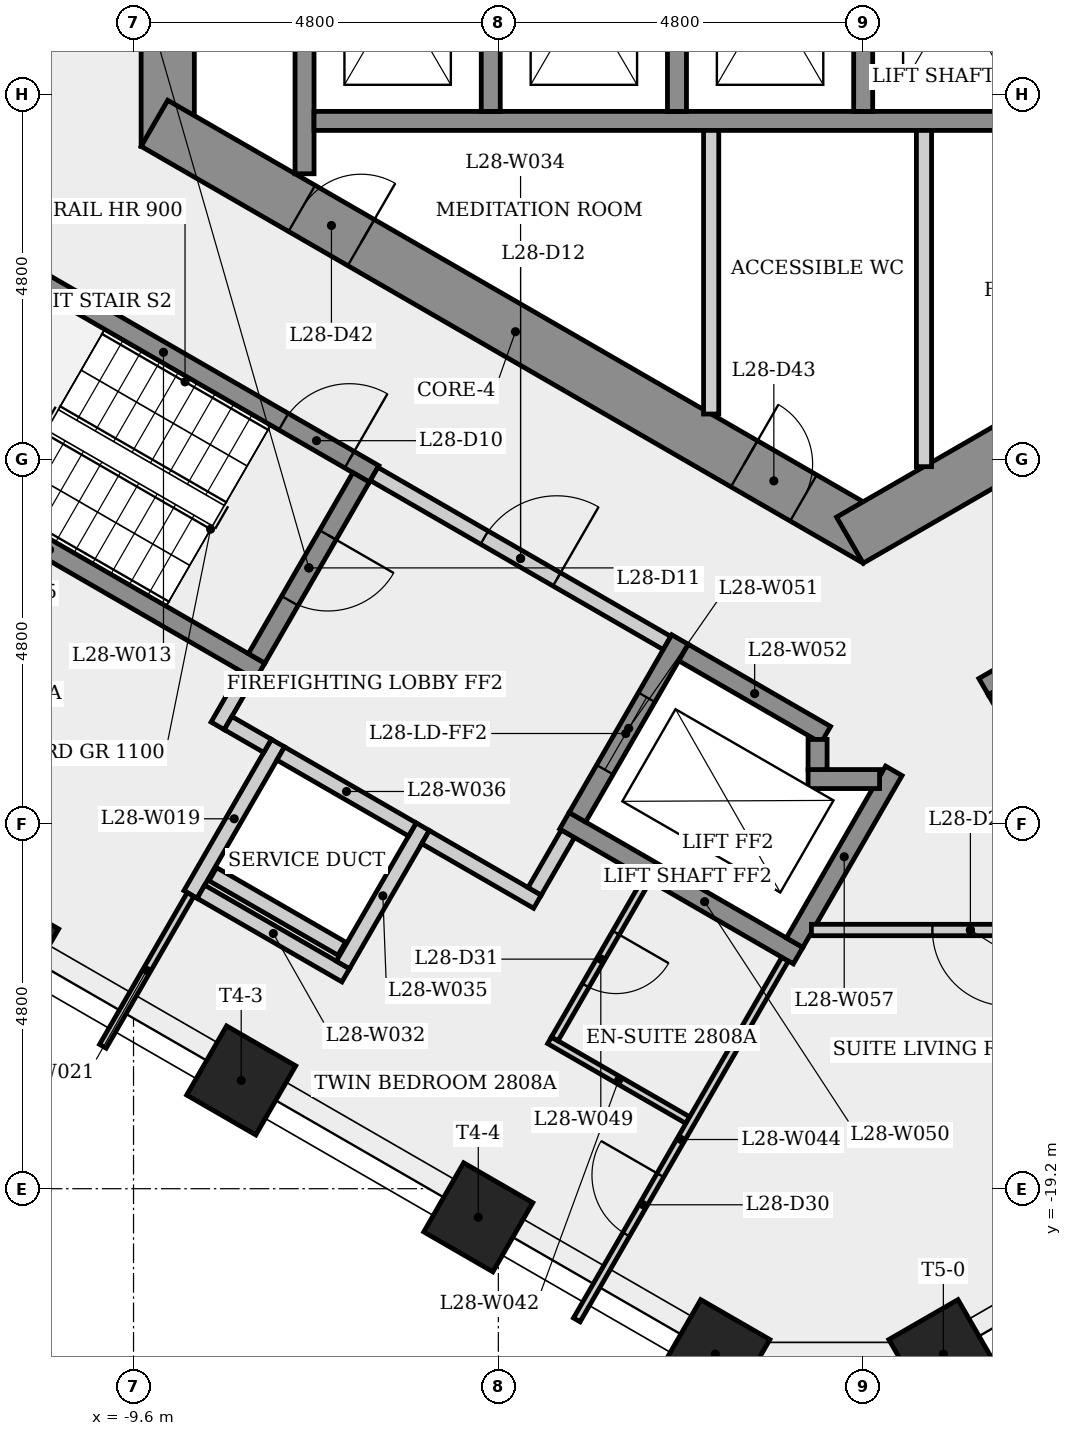
"""IFC4 building model, lengths in metres.
Left out: names, types, materials, properties, quantities, classifications, styles, units other than length and angle.
Written with IfcOpenShell. Run it as: python <this file> out.ifc"""

import sys

from ifc_helpers import new_model, si_unit, direction, frame, frame_2d, origin, origin_2d, place, context, subcontext, project, spatial, rectangle, extrude, element, fill, save


model = new_model("IFC4")
c1 = context("Model", 3, precision=1e-05, world=origin(), true_north=direction((0.0, 1.0)))
c2 = subcontext(c1, "Body", "Model", "MODEL_VIEW")
j1 = project(units=[si_unit("LENGTHUNIT", "METRE"), si_unit("PLANEANGLEUNIT", "RADIAN")], contexts=[c1])
p1 = place(None, origin())
s1 = spatial("IfcSite", under=j1, at=p1, CompositionType="ELEMENT")
p2 = place(p1, origin())
s2 = spatial("IfcBuilding", under=s1, at=p2, CompositionType="ELEMENT")
p3 = place(p2, frame((0.0, 0.0, 106.9)))
s3 = spatial("IfcBuildingStorey", under=s2, at=p3, CompositionType="ELEMENT", Elevation=106.9)
p4 = place(p3, frame((-9.15, 5.485, 0.0), z_axis=(0.0, 0.0, 1.0), x_axis=(0.0, -1.0, 0.0)))
e1 = element("IfcWall", 1, at=p4, inside=s3, PredefinedType="SHEAR", context=c2, shape_type="SweptSolid", body=[
    extrude(rectangle(XDim=10.97, YDim=0.7, at=frame_2d((5.485, 0.0))), origin(), (0.0, 0.0, 1.0), 3.4),
])
p5 = place(p4, frame((4.685, 0.0, 0.0)))
e2 = element("IfcOpeningElement", 2, at=p5, cuts=e1, PredefinedType="OPENING", context=c2, shape_type="SweptSolid", body=[
    extrude(rectangle(XDim=1.6, YDim=2.1, at=frame_2d((0.8, 1.05))), frame((0.0, 0.36, 0.0), z_axis=(0.0, -1.0, 0.0), x_axis=(1.0, 0.0, 0.0)), (0.0, 0.0, 1.0), 0.72),
])
p6 = place(p3, frame((-9.325, -5.182, 0.0), z_axis=(0.0, 0.0, 1.0), x_axis=(0.866023993627, -0.500002442456, 0.0)))
e3 = element("IfcWall", 3, at=p6, inside=s3, PredefinedType="SHEAR", context=c2, shape_type="SweptSolid", body=[
    extrude(rectangle(XDim=10.97, YDim=0.7, at=frame_2d((5.485, 0.0))), origin(), (0.0, 0.0, 1.0), 3.4),
])
p7 = place(p6, frame((2.239, 0.0, 0.0)))
e4 = element("IfcOpeningElement", 4, at=p7, cuts=e3, PredefinedType="OPENING", context=c2, shape_type="SweptSolid", body=[
    extrude(rectangle(XDim=0.9, YDim=2.1, at=frame_2d((0.45, 1.05))), frame((0.0, 0.36, 0.0), z_axis=(0.0, -1.0, 0.0), x_axis=(1.0, 0.0, 0.0)), (0.0, 0.0, 1.0), 0.72),
])
p8 = place(p6, frame((8.96, 0.0, 0.0)))
e5 = element("IfcOpeningElement", 5, at=p8, cuts=e3, PredefinedType="OPENING", context=c2, shape_type="SweptSolid", body=[
    extrude(rectangle(XDim=0.9, YDim=2.1, at=frame_2d((0.45, 1.05))), frame((0.0, 0.36, 0.0), z_axis=(0.0, -1.0, 0.0), x_axis=(1.0, 0.0, 0.0)), (0.0, 0.0, 1.0), 0.72),
])
p9 = place(p3, frame((-0.175, -10.667, 0.0), z_axis=(0.0, 0.0, 1.0), x_axis=(0.866023993627, 0.500002442456, 0.0)))
e6 = element("IfcWall", 6, at=p9, inside=s3, PredefinedType="SHEAR", context=c2, shape_type="SweptSolid", body=[
    extrude(rectangle(XDim=10.97, YDim=0.7, at=frame_2d((5.485, 0.0))), origin(), (0.0, 0.0, 1.0), 3.4),
])
p10 = place(p9, frame((7.137, 0.0, 0.0)))
e7 = element("IfcOpeningElement", 7, at=p10, cuts=e6, PredefinedType="OPENING", context=c2, shape_type="SweptSolid", body=[
    extrude(rectangle(XDim=0.9, YDim=2.1, at=frame_2d((0.45, 1.05))), frame((0.0, 0.36, 0.0), z_axis=(0.0, -1.0, 0.0), x_axis=(1.0, 0.0, 0.0)), (0.0, 0.0, 1.0), 0.72),
])
for number, where, z_axis, x_axis in (
    (8, (-11.302, -15.975, 0.0), (0.0, 0.0, 1.0), (-0.5, -0.866, 0.0)),
    (9, (-8.183, -17.775, 0.0), (0.0, 0.0, 1.0), (-0.5, -0.866, 0.0)),
    (10, (-5.064, -19.576, 0.0), (0.0, 0.0, 1.0), (-0.5, -0.866, 0.0)),
    (11, (-1.945, -21.377, 0.0), (0.0, 0.0, 1.0), (-0.5, -0.866, 0.0)),
    (12, (1.055, -21.377, 0.0), (0.0, 0.0, 1.0), (0.5, -0.866, 0.0)),
):
    element("IfcColumn", number, at=place(p3, frame(where, z_axis=z_axis, x_axis=x_axis)), inside=s3, PredefinedType="COLUMN", context=c2, shape_type="SweptSolid", body=[
        extrude(rectangle(XDim=1.05, YDim=1.05, at=origin_2d()), origin(), (0.0, 0.0, 1.0), 3.4),
    ])
p11 = place(p3, frame((-11.977, -6.595, 0.0), z_axis=(0.0, 0.0, 1.0), x_axis=(0.866025499775, -0.499999833739, 0.0)))
e13 = element("IfcWall", 13, at=p11, inside=s3, PredefinedType="SHEAR", context=c2, shape_type="SweptSolid", body=[
    extrude(rectangle(XDim=6.4, YDim=0.25, at=frame_2d((3.2, 0.0))), origin(), (0.0, 0.0, 1.0), 3.05),
])
p12 = place(p11, frame((5.025, 0.0, 0.0)))
e14 = element("IfcOpeningElement", 14, at=p12, cuts=e13, PredefinedType="OPENING", context=c2, shape_type="SweptSolid", body=[
    extrude(rectangle(XDim=1.0, YDim=2.1, at=frame_2d((0.5, 1.05))), frame((0.0, 0.135, 0.0), z_axis=(0.0, -1.0, 0.0), x_axis=(1.0, 0.0, 0.0)), (0.0, 0.0, 1.0), 0.27),
])
p13 = place(p3, frame((-8.85, -15.329, 0.0), z_axis=(0.0, 0.0, 1.0), x_axis=(0.500077740698, 0.865980515519, 0.0)))
e15 = element("IfcWall", 15, at=p13, inside=s3, PredefinedType="PLUMBINGWALL", context=c2, shape_type="SweptSolid", body=[
    extrude(rectangle(XDim=2.3, YDim=0.2, at=frame_2d((1.15, 0.0))), origin(), (0.0, 0.0, 1.0), 3.05),
])
p14 = place(p3, frame((-8.85, -15.329, 0.0), z_axis=(0.0, 0.0, 1.0), x_axis=(-0.500009533716, -0.866019899421, 0.0)))
e16 = element("IfcWall", 16, at=p14, inside=s3, PredefinedType="PARTITIONING", context=c2, shape_type="SweptSolid", body=[
    extrude(rectangle(XDim=2.307, YDim=0.1, at=frame_2d((1.153, 0.0))), origin(), (0.0, 0.0, 1.0), 3.05),
])
p15 = place(p3, frame((-8.493, -13.11, 0.0), z_axis=(0.0, 0.0, 1.0), x_axis=(0.500067724834, 0.865986299303, 0.0)))
e17 = element("IfcWall", 17, at=p15, inside=s3, PredefinedType="PARTITIONING", context=c2, shape_type="SweptSolid", body=[
    extrude(rectangle(XDim=0.775, YDim=0.2, at=frame_2d((0.388, 0.0))), origin(), (0.0, 0.0, 1.0), 3.05),
])
p16 = place(p3, frame((-7.935, -12.393, 0.0), z_axis=(0.0, 0.0, 1.0), x_axis=(-0.866025499775, 0.499999833739, 0.0)))
e18 = element("IfcWall", 18, at=p16, inside=s3, PredefinedType="SHEAR", context=c2, shape_type="SweptSolid", body=[
    extrude(rectangle(XDim=6.4, YDim=0.25, at=frame_2d((3.2, 0.0))), origin(), (0.0, 0.0, 1.0), 3.05),
])
p17 = place(p3, frame((-7.836, -13.373, 0.0), z_axis=(0.0, 0.0, 1.0), x_axis=(-0.866232998003, 0.499640263761, 0.0)))
e19 = element("IfcWall", 19, at=p17, inside=s3, PredefinedType="PARTITIONING", context=c2, shape_type="SweptSolid", body=[
    extrude(rectangle(XDim=0.6, YDim=0.2, at=frame_2d((0.3, 0.0))), origin(), (0.0, 0.0, 1.0), 3.05),
])
p18 = place(p3, frame((-7.35, -5.846, 0.0), z_axis=(0.0, 0.0, 1.0), x_axis=(0.0, 1.0, 0.0)))
e20 = element("IfcWall", 20, at=p18, inside=s3, PredefinedType="SHEAR", context=c2, shape_type="SweptSolid", body=[
    extrude(rectangle(XDim=4.171, YDim=0.25, at=frame_2d((2.085, 0.0))), origin(), (0.0, 0.0, 1.0), 3.05),
])
p19 = place(p3, frame((-6.808, -16.392, 0.0), z_axis=(0.0, 0.0, 1.0), x_axis=(-0.866008176907, 0.50002983664, 0.0)))
e21 = element("IfcWall", 21, at=p19, inside=s3, PredefinedType="PLUMBINGWALL", context=c2, shape_type="SweptSolid", body=[
    extrude(rectangle(XDim=2.2, YDim=0.2, at=frame_2d((1.1, 0.0))), origin(), (0.0, 0.0, 1.0), 3.05),
])
p20 = place(p3, frame((-6.605, -9.841, 0.0), z_axis=(0.0, 0.0, 1.0), x_axis=(-0.499996545922, -0.866027397988, 0.0)))
e22 = element("IfcWall", 22, at=p20, inside=s3, PredefinedType="SHEAR", context=c2, shape_type="SweptSolid", body=[
    extrude(rectangle(XDim=2.75, YDim=0.25, at=frame_2d((1.375, 0.0))), origin(), (0.0, 0.0, 1.0), 3.05),
])
p21 = place(p20, frame((0.875, 0.0, 0.0)))
e23 = element("IfcOpeningElement", 23, at=p21, cuts=e22, PredefinedType="OPENING", context=c2, shape_type="SweptSolid", body=[
    extrude(rectangle(XDim=1.0, YDim=2.1, at=frame_2d((0.5, 1.05))), frame((0.0, 0.135, 0.0), z_axis=(0.0, -1.0, 0.0), x_axis=(1.0, 0.0, 0.0)), (0.0, 0.0, 1.0), 0.27),
])
p22 = place(p3, frame((-6.435, -9.795, 0.0), z_axis=(0.0, 0.0, 1.0), x_axis=(0.866012907634, -0.500021643343, 0.0)))
e24 = element("IfcWall", 24, at=p22, inside=s3, PredefinedType="PARTITIONING", context=c2, shape_type="SweptSolid", body=[
    extrude(rectangle(XDim=4.45, YDim=0.2, at=frame_2d((2.225, 0.0))), origin(), (0.0, 0.0, 1.0), 3.05),
])
p23 = place(p22, frame((1.675, 0.0, 0.0)))
e25 = element("IfcOpeningElement", 25, at=p23, cuts=e24, PredefinedType="OPENING", context=c2, shape_type="SweptSolid", body=[
    extrude(rectangle(XDim=1.1, YDim=2.1, at=frame_2d((0.55, 1.05))), frame((0.0, 0.11, 0.0), z_axis=(0.0, -1.0, 0.0), x_axis=(1.0, 0.0, 0.0)), (0.0, 0.0, 1.0), 0.22),
])
p24 = place(p3, frame((-5.795, -14.437, 0.0), z_axis=(0.0, 0.0, 1.0), x_axis=(-0.500027713859, -0.866009402589, 0.0)))
e26 = element("IfcWall", 26, at=p24, inside=s3, PredefinedType="PLUMBINGWALL", context=c2, shape_type="SweptSolid", body=[
    extrude(rectangle(XDim=2.1, YDim=0.2, at=frame_2d((1.05, 0.0))), origin(), (0.0, 0.0, 1.0), 3.05),
])
p25 = place(p3, frame((-5.931, -14.473, 0.0), z_axis=(0.0, 0.0, 1.0), x_axis=(-0.866041268327, 0.499972520799, 0.0)))
e27 = element("IfcWall", 27, at=p25, inside=s3, PredefinedType="PLUMBINGWALL", context=c2, shape_type="SweptSolid", body=[
    extrude(rectangle(XDim=2.0, YDim=0.2, at=frame_2d((1.0, 0.0))), origin(), (0.0, 0.0, 1.0), 3.05),
])
p26 = place(p3, frame((-7.225, -5.15, 0.0), z_axis=(0.0, 0.0, 1.0), x_axis=(1.0, 0.0, 0.0)))
e28 = element("IfcWall", 28, at=p26, inside=s3, PredefinedType="SHEAR", context=c2, shape_type="SweptSolid", body=[
    extrude(rectangle(XDim=14.7, YDim=0.25, at=frame_2d((7.35, 0.0))), origin(), (0.0, 0.0, 1.0), 3.05),
])
p27 = place(p3, frame((-4.9, -1.925, 0.0), z_axis=(0.0, 0.0, 1.0), x_axis=(0.0, -1.0, 0.0)))
e29 = element("IfcWall", 29, at=p27, inside=s3, PredefinedType="SHEAR", context=c2, shape_type="SweptSolid", body=[
    extrude(rectangle(XDim=3.1, YDim=0.25, at=frame_2d((1.55, 0.0))), origin(), (0.0, 0.0, 1.0), 3.4),
])
p28 = place(p3, frame((-4.286, -15.423, 0.0), z_axis=(0.0, 0.0, 1.0), x_axis=(-0.866025371046, 0.500000056704, 0.0)))
e30 = element("IfcWall", 30, at=p28, inside=s3, PredefinedType="PARTITIONING", context=c2, shape_type="SweptSolid", body=[
    extrude(rectangle(XDim=1.7, YDim=0.2, at=frame_2d((0.85, 0.0))), origin(), (0.0, 0.0, 1.0), 3.05),
])
p29 = place(p3, frame((-4.127, -17.247, 0.0), z_axis=(0.0, 0.0, 1.0), x_axis=(0.866038466041, -0.499977374825, 0.0)))
e31 = element("IfcWall", 31, at=p29, inside=s3, PredefinedType="PARTITIONING", context=c2, shape_type="SweptSolid", body=[
    extrude(rectangle(XDim=2.1, YDim=0.1, at=frame_2d((1.05, 0.0))), origin(), (0.0, 0.0, 1.0), 3.05),
])
p30 = place(p3, frame((-3.885, -14.529, 0.0), z_axis=(0.0, 0.0, 1.0), x_axis=(-0.499859285417, -0.866106630146, 0.0)))
e32 = element("IfcWall", 32, at=p30, inside=s3, PredefinedType="PARTITIONING", context=c2, shape_type="SweptSolid", body=[
    extrude(rectangle(XDim=0.875, YDim=0.2, at=frame_2d((0.438, 0.0))), origin(), (0.0, 0.0, 1.0), 3.05),
])
p31 = place(p3, frame((-3.768, -20.926, 0.0), z_axis=(0.0, 0.0, 1.0), x_axis=(0.499980760091, 0.866036511666, 0.0)))
e33 = element("IfcWall", 33, at=p31, inside=s3, PredefinedType="PARTITIONING", context=c2, shape_type="SweptSolid", body=[
    extrude(rectangle(XDim=5.482, YDim=0.1, at=frame_2d((2.741, 0.0))), origin(), (0.0, 0.0, 1.0), 3.05),
])
p32 = place(p31, frame((1.299, 0.0, 0.0)))
e34 = element("IfcOpeningElement", 34, at=p32, cuts=e33, PredefinedType="OPENING", context=c2, shape_type="SweptSolid", body=[
    extrude(rectangle(XDim=0.9, YDim=2.1, at=frame_2d((0.45, 1.05))), frame((0.0, 0.06, 0.0), z_axis=(0.0, -1.0, 0.0), x_axis=(1.0, 0.0, 0.0)), (0.0, 0.0, 1.0), 0.12),
])
p33 = place(p3, frame((-2.846, -15.129, 0.0), z_axis=(0.0, 0.0, 1.0), x_axis=(-0.500047793048, -0.865997808697, 0.0)))
e35 = element("IfcWall", 35, at=p33, inside=s3, PredefinedType="PARTITIONING", context=c2, shape_type="SweptSolid", body=[
    extrude(rectangle(XDim=2.425, YDim=0.1, at=frame_2d((1.212, 0.0))), origin(), (0.0, 0.0, 1.0), 3.05),
])
p34 = place(p33, frame((0.812, 0.0, 0.0)))
e36 = element("IfcOpeningElement", 36, at=p34, cuts=e35, PredefinedType="OPENING", context=c2, shape_type="SweptSolid", body=[
    extrude(rectangle(XDim=0.8, YDim=2.1, at=frame_2d((0.4, 1.05))), frame((0.0, 0.06, 0.0), z_axis=(0.0, -1.0, 0.0), x_axis=(1.0, 0.0, 0.0)), (0.0, 0.0, 1.0), 0.12),
])
p35 = place(p3, frame((-3.931, -14.358, 0.0), z_axis=(0.0, 0.0, 1.0), x_axis=(0.8660424351, -0.499970499736, 0.0)))
e37 = element("IfcWall", 37, at=p35, inside=s3, PredefinedType="SHEAR", context=c2, shape_type="SweptSolid", body=[
    extrude(rectangle(XDim=3.55, YDim=0.25, at=frame_2d((1.775, 0.0))), origin(), (0.0, 0.0, 1.0), 3.05),
])
p36 = place(p3, frame((-2.41, -11.974, 0.0), z_axis=(0.0, 0.0, 1.0), x_axis=(-0.50000943426, -0.866019956843, 0.0)))
e38 = element("IfcWall", 38, at=p36, inside=s3, PredefinedType="SHEAR", context=c2, shape_type="SweptSolid", body=[
    extrude(rectangle(XDim=2.7, YDim=0.25, at=frame_2d((1.35, 0.0))), origin(), (0.0, 0.0, 1.0), 3.05),
])
p37 = place(p36, frame((0.877, 0.0, 0.0)))
e39 = element("IfcOpeningElement", 39, at=p37, cuts=e38, PredefinedType="OPENING", context=c2, shape_type="SweptSolid", body=[
    extrude(rectangle(XDim=1.1, YDim=2.1, at=frame_2d((0.55, 1.05))), frame((0.0, 0.135, 0.0), z_axis=(0.0, -1.0, 0.0), x_axis=(1.0, 0.0, 0.0)), (0.0, 0.0, 1.0), 0.27),
])
p38 = place(p3, frame((-2.364, -12.145, 0.0), z_axis=(0.0, 0.0, 1.0), x_axis=(0.86603892542, -0.499976579108, 0.0)))
e40 = element("IfcWall", 40, at=p38, inside=s3, PredefinedType="SHEAR", context=c2, shape_type="SweptSolid", body=[
    extrude(rectangle(XDim=2.162, YDim=0.25, at=frame_2d((1.081, 0.0))), origin(), (0.0, 0.0, 1.0), 3.05),
])
p39 = place(p3, frame((-2.45, -1.925, 0.0), z_axis=(0.0, 0.0, 1.0), x_axis=(0.0, -1.0, 0.0)))
e41 = element("IfcWall", 41, at=p39, inside=s3, PredefinedType="SHEAR", context=c2, shape_type="SweptSolid", body=[
    extrude(rectangle(XDim=3.1, YDim=0.25, at=frame_2d((1.55, 0.0))), origin(), (0.0, 0.0, 1.0), 3.4),
])
p40 = place(p3, frame((-2.0, -5.275, 0.0), z_axis=(0.0, 0.0, 1.0), x_axis=(0.0, -1.0, 0.0)))
e42 = element("IfcWall", 42, at=p40, inside=s3, PredefinedType="PARTITIONING", context=c2, shape_type="SweptSolid", body=[
    extrude(rectangle(XDim=3.732, YDim=0.2, at=frame_2d((1.866, 0.0))), origin(), (0.0, 0.0, 1.0), 3.05),
])
p41 = place(p3, frame((-0.902, -15.962, 0.0), z_axis=(0.0, 0.0, 1.0), x_axis=(0.499981517636, 0.866036074319, 0.0)))
e43 = element("IfcWall", 43, at=p41, inside=s3, PredefinedType="SHEAR", context=c2, shape_type="SweptSolid", body=[
    extrude(rectangle(XDim=2.61, YDim=0.25, at=frame_2d((1.305, 0.0))), origin(), (0.0, 0.0, 1.0), 3.05),
])
p42 = place(p3, frame((-0.725, -13.81, 0.0), z_axis=(0.0, 0.0, 1.0), x_axis=(1.0, 0.0, 0.0)))
e44 = element("IfcWall", 44, at=p42, inside=s3, PredefinedType="SHEAR", context=c2, shape_type="SweptSolid", body=[
    extrude(rectangle(XDim=0.941, YDim=0.25, at=frame_2d((0.47, 0.0))), origin(), (0.0, 0.0, 1.0), 3.4),
])
p43 = place(p3, frame((-0.6, -13.289, 0.0), z_axis=(0.0, 0.0, 1.0), x_axis=(0.0, -1.0, 0.0)))
e45 = element("IfcWall", 45, at=p43, inside=s3, PredefinedType="SHEAR", context=c2, shape_type="SweptSolid", body=[
    extrude(rectangle(XDim=0.396, YDim=0.25, at=frame_2d((0.198, 0.0))), origin(), (0.0, 0.0, 1.0), 3.4),
])
p44 = place(p3, frame((0.0, -1.925, 0.0), z_axis=(0.0, 0.0, 1.0), x_axis=(0.0, -1.0, 0.0)))
e46 = element("IfcWall", 46, at=p44, inside=s3, PredefinedType="SHEAR", context=c2, shape_type="SweptSolid", body=[
    extrude(rectangle(XDim=3.1, YDim=0.25, at=frame_2d((1.55, 0.0))), origin(), (0.0, 0.0, 1.0), 3.4),
])
p45 = place(p3, frame((0.8, -5.275, 0.0), z_axis=(0.0, 0.0, 1.0), x_axis=(0.0, -1.0, 0.0)))
e47 = element("IfcWall", 47, at=p45, inside=s3, PredefinedType="PARTITIONING", context=c2, shape_type="SweptSolid", body=[
    extrude(rectangle(XDim=4.425, YDim=0.2, at=frame_2d((2.212, 0.0))), origin(), (0.0, 0.0, 1.0), 3.05),
])
p46 = place(p3, frame((1.585, -12.595, 0.0), z_axis=(0.0, 0.0, 1.0), x_axis=(0.866036417653, 0.499980922934, 0.0)))
e48 = element("IfcWall", 48, at=p46, inside=s3, PredefinedType="SHEAR", context=c2, shape_type="SweptSolid", body=[
    extrude(rectangle(XDim=6.65, YDim=0.25, at=frame_2d((3.325, 0.0))), origin(), (0.0, 0.0, 1.0), 3.05),
])
p47 = place(p46, frame((5.275, 0.0, 0.0)))
e49 = element("IfcOpeningElement", 49, at=p47, cuts=e48, PredefinedType="OPENING", context=c2, shape_type="SweptSolid", body=[
    extrude(rectangle(XDim=1.0, YDim=2.1, at=frame_2d((0.5, 1.05))), frame((0.0, 0.135, 0.0), z_axis=(0.0, -1.0, 0.0), x_axis=(1.0, 0.0, 0.0)), (0.0, 0.0, 1.0), 0.27),
])
p48 = place(p3, frame((3.256, -15.239, 0.0), z_axis=(0.0, 0.0, 1.0), x_axis=(-0.50002537861, 0.866010750942, 0.0)))
e50 = element("IfcWall", 50, at=p48, inside=s3, PredefinedType="SHEAR", context=c2, shape_type="SweptSolid", body=[
    extrude(rectangle(XDim=3.0, YDim=0.25, at=frame_2d((1.5, 0.0))), origin(), (0.0, 0.0, 1.0), 3.05),
])
p49 = place(p3, frame((3.502, -15.796, 0.0), z_axis=(0.0, 0.0, 1.0), x_axis=(-1.0, 0.0, 0.0)))
e51 = element("IfcWall", 51, at=p49, inside=s3, PredefinedType="PARTITIONING", context=c2, shape_type="SweptSolid", body=[
    extrude(rectangle(XDim=4.183, YDim=0.15, at=frame_2d((2.092, 0.0))), origin(), (0.0, 0.0, 1.0), 3.05),
])
p50 = place(p49, frame((1.592, 0.0, 0.0)))
e52 = element("IfcOpeningElement", 52, at=p50, cuts=e51, PredefinedType="OPENING", context=c2, shape_type="SweptSolid", body=[
    extrude(rectangle(XDim=1.0, YDim=2.1, at=frame_2d((0.5, 1.05))), frame((0.0, 0.085, 0.0), z_axis=(0.0, -1.0, 0.0), x_axis=(1.0, 0.0, 0.0)), (0.0, 0.0, 1.0), 0.17),
])
p51 = place(p3, frame((-6.86, -16.042, 0.0), z_axis=(0.0, 0.0, 1.0), x_axis=(-0.866042469362, 0.499970440388, 0.0)))
e53 = element("IfcWall", 53, at=p51, inside=s3, PredefinedType="PLUMBINGWALL", context=c2, shape_type="SweptSolid", body=[
    extrude(rectangle(XDim=1.96, YDim=0.2, at=frame_2d((0.98, 0.0))), origin(), (0.0, 0.0, 1.0), 3.05),
])
p52 = place(p12, origin())
e54 = element("IfcDoor", 54, at=p52, inside=s3, OperationType="SINGLE_SWING_RIGHT", PredefinedType="DOOR", context=c2, shape_type="SweptSolid", body=[
    extrude(rectangle(XDim=1.0, YDim=2.1, at=frame_2d((0.5, 1.05))), frame((0.0, 0.025, 0.0), z_axis=(0.0, -1.0, 0.0), x_axis=(1.0, 0.0, 0.0)), (0.0, 0.0, 1.0), 0.05),
])
fill(e14, e54)
p53 = place(p21, origin())
e55 = element("IfcDoor", 55, at=p53, inside=s3, OperationType="SINGLE_SWING_LEFT", PredefinedType="DOOR", context=c2, shape_type="SweptSolid", body=[
    extrude(rectangle(XDim=1.0, YDim=2.1, at=frame_2d((0.5, 1.05))), frame((0.0, 0.025, 0.0), z_axis=(0.0, -1.0, 0.0), x_axis=(1.0, 0.0, 0.0)), (0.0, 0.0, 1.0), 0.05),
])
fill(e23, e55)
p54 = place(p23, origin())
e56 = element("IfcDoor", 56, at=p54, inside=s3, OperationType="SINGLE_SWING_RIGHT", PredefinedType="DOOR", context=c2, shape_type="SweptSolid", body=[
    extrude(rectangle(XDim=1.1, YDim=2.1, at=frame_2d((0.55, 1.05))), frame((0.0, 0.025, 0.0), z_axis=(0.0, -1.0, 0.0), x_axis=(1.0, 0.0, 0.0)), (0.0, 0.0, 1.0), 0.05),
])
fill(e25, e56)
p55 = place(p37, origin())
e57 = element("IfcDoor", 57, at=p55, inside=s3, OperationType="SLIDING_TO_LEFT", PredefinedType="DOOR", context=c2, shape_type="SweptSolid", body=[
    extrude(rectangle(XDim=1.1, YDim=2.1, at=frame_2d((0.55, 1.05))), frame((0.0, 0.025, 0.0), z_axis=(0.0, -1.0, 0.0), x_axis=(1.0, 0.0, 0.0)), (0.0, 0.0, 1.0), 0.05),
])
fill(e39, e57)
p56 = place(p50, origin())
e58 = element("IfcDoor", 58, at=p56, inside=s3, OperationType="SINGLE_SWING_LEFT", PredefinedType="DOOR", context=c2, shape_type="SweptSolid", body=[
    extrude(rectangle(XDim=1.0, YDim=2.1, at=frame_2d((0.5, 1.05))), frame((0.0, 0.025, 0.0), z_axis=(0.0, -1.0, 0.0), x_axis=(1.0, 0.0, 0.0)), (0.0, 0.0, 1.0), 0.05),
])
fill(e52, e58)
p57 = place(p32, origin())
e59 = element("IfcDoor", 59, at=p57, inside=s3, OperationType="SINGLE_SWING_RIGHT", PredefinedType="DOOR", context=c2, shape_type="SweptSolid", body=[
    extrude(rectangle(XDim=0.9, YDim=2.1, at=frame_2d((0.45, 1.05))), frame((0.0, 0.025, 0.0), z_axis=(0.0, -1.0, 0.0), x_axis=(1.0, 0.0, 0.0)), (0.0, 0.0, 1.0), 0.05),
])
fill(e34, e59)
p58 = place(p34, origin())
e60 = element("IfcDoor", 60, at=p58, inside=s3, OperationType="SINGLE_SWING_LEFT", PredefinedType="DOOR", context=c2, shape_type="SweptSolid", body=[
    extrude(rectangle(XDim=0.8, YDim=2.1, at=frame_2d((0.4, 1.05))), frame((0.0, 0.025, 0.0), z_axis=(0.0, -1.0, 0.0), x_axis=(1.0, 0.0, 0.0)), (0.0, 0.0, 1.0), 0.05),
])
fill(e36, e60)
p59 = place(p7, origin())
e61 = element("IfcDoor", 61, at=p59, inside=s3, OperationType="SINGLE_SWING_RIGHT", PredefinedType="DOOR", context=c2, shape_type="SweptSolid", body=[
    extrude(rectangle(XDim=0.9, YDim=2.1, at=frame_2d((0.45, 1.05))), frame((0.0, 0.025, 0.0), z_axis=(0.0, -1.0, 0.0), x_axis=(1.0, 0.0, 0.0)), (0.0, 0.0, 1.0), 0.05),
])
fill(e4, e61)
p60 = place(p8, origin())
e62 = element("IfcDoor", 62, at=p60, inside=s3, OperationType="SINGLE_SWING_LEFT", PredefinedType="DOOR", context=c2, shape_type="SweptSolid", body=[
    extrude(rectangle(XDim=0.9, YDim=2.1, at=frame_2d((0.45, 1.05))), frame((0.0, 0.025, 0.0), z_axis=(0.0, -1.0, 0.0), x_axis=(1.0, 0.0, 0.0)), (0.0, 0.0, 1.0), 0.05),
])
fill(e5, e62)
save(model, sys.argv[1])
